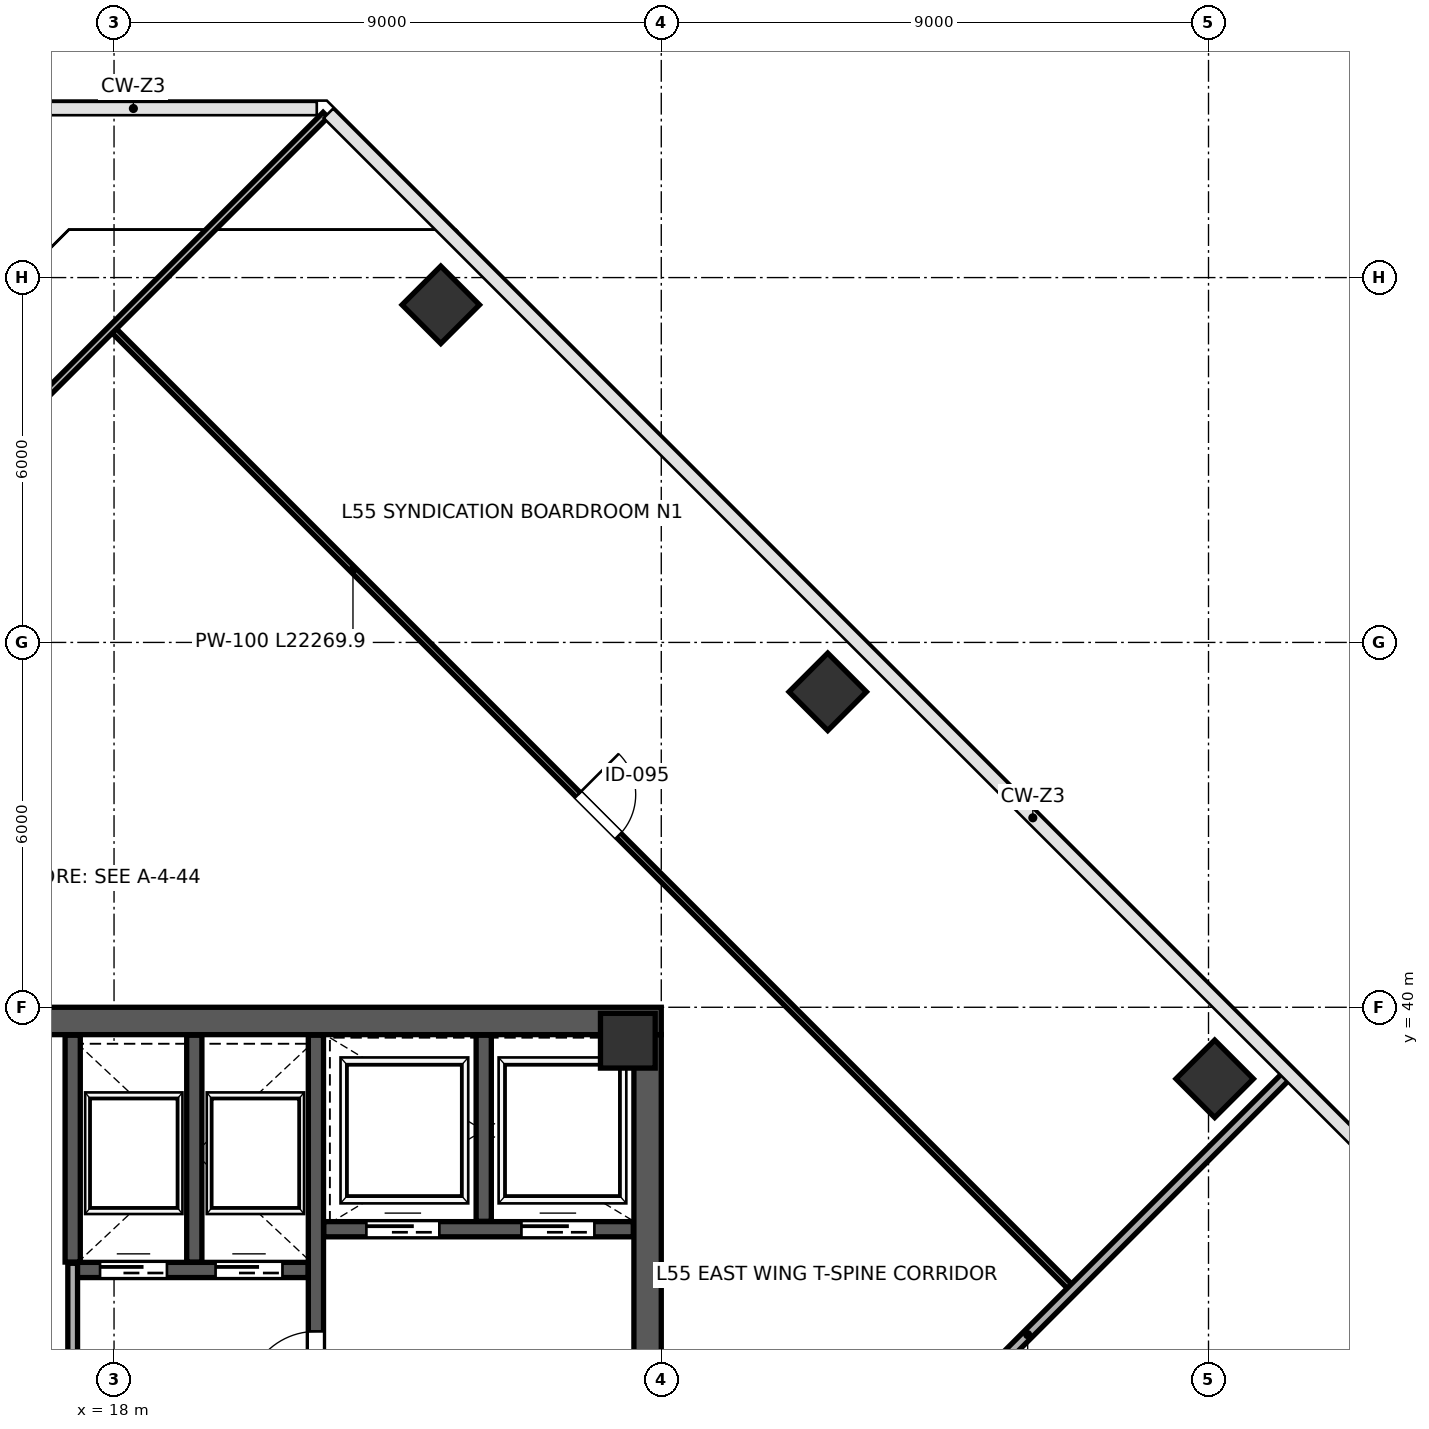
"""IFC4 building model, lengths in metres.
Left out: names, types, materials, properties, quantities, classifications, styles, units other than length and angle.
Written with IfcOpenShell. Run it as: python <this file> out.ifc"""

import sys

from ifc_helpers import new_model, si_unit, direction, frame, frame_2d, origin, origin_2d, place, context, subcontext, project, spatial, rectangle, extrude, source, transform, mapped, element, fill, save


model = new_model("IFC4")
c1 = context("Model", 3, precision=1e-05, world=origin(), true_north=direction((0.0, 1.0)))
c2 = subcontext(c1, "Body", "Model", "MODEL_VIEW")
j1 = project(units=[si_unit("LENGTHUNIT", "METRE"), si_unit("PLANEANGLEUNIT", "RADIAN")], contexts=[c1])
p1 = place(None, origin())
s1 = spatial("IfcSite", under=j1, at=p1, CompositionType="ELEMENT")
p2 = place(p1, origin())
s2 = spatial("IfcBuilding", under=s1, at=p2, CompositionType="ELEMENT")
p3 = place(p2, frame((0.0, 0.0, 245.8)))
s3 = spatial("IfcBuildingStorey", under=s2, at=p3, CompositionType="ELEMENT", Elevation=245.8)
m1 = source(origin(), c2, "Body", "SweptSolid", [
    extrude(rectangle(XDim=0.9, YDim=0.9, at=origin_2d()), origin(), (0.0, 0.0, 1.0), 4.198),
])
p4 = place(p3, frame((26.45, 39.45, 0.001), z_axis=(0.0, 0.0, 1.0), x_axis=(1.0, 0.0, 0.0)))
e1 = element("IfcColumn", 1, at=p4, inside=s3, PredefinedType="COLUMN", context=c2, shape_type="MappedRepresentation", body=[
    mapped(m1, transform((0.0, 0.0, 0.0), scale=1.0)),
])
m2 = source(origin(), c2, "Body", "SweptSolid", [
    extrude(rectangle(XDim=0.9, YDim=0.9, at=origin_2d()), origin(), (0.0, 0.0, 1.0), 4.198),
])
for number, where, z_axis, x_axis in (
    (2, (23.374, 51.552, 0.001), (0.0, 0.0, 1.0), (-0.707, 0.707, 0.0)),
    (3, (29.738, 45.188, 0.001), (0.0, 0.0, 1.0), (-0.707, 0.707, 0.0)),
    (4, (36.102, 38.823, 0.001), (0.0, 0.0, 1.0), (-0.707, 0.707, 0.0)),
):
    element("IfcColumn", number, at=place(p3, frame(where, z_axis=z_axis, x_axis=x_axis)), inside=s3, PredefinedType="COLUMN", context=c2, shape_type="MappedRepresentation", body=[
        mapped(m2, transform((0.0, 0.0, 0.0), scale=1.0)),
    ])
p5 = place(p3, frame((26.775, 24.45, 0.0), z_axis=(0.0, 0.0, 1.0), x_axis=(0.0, 1.0, 0.0)))
e5 = element("IfcWall", 5, at=p5, inside=s3, PredefinedType="SHEAR", context=c2, shape_type="SweptSolid", body=[
    extrude(rectangle(XDim=15.1, YDim=0.45, at=frame_2d((7.55, 0.0))), origin(), (0.0, 0.0, 1.0), 3.96),
])
p6 = place(p5, frame((8.6, 0.0, 0.0)))
e6 = element("IfcOpeningElement", 6, at=p6, cuts=e5, PredefinedType="OPENING", context=c2, shape_type="SweptSolid", body=[
    extrude(rectangle(XDim=1.15, YDim=2.2, at=frame_2d((0.575, 1.1))), frame((0.0, 0.235, 0.0), z_axis=(0.0, -1.0, 0.0), x_axis=(1.0, 0.0, 0.0)), (0.0, 0.0, 1.0), 0.47),
])
p7 = place(p3, frame((9.0, 39.775, 0.0), z_axis=(0.0, 0.0, 1.0), x_axis=(1.0, 0.0, 0.0)))
e7 = element("IfcWall", 7, at=p7, inside=s3, PredefinedType="SHEAR", context=c2, shape_type="SweptSolid", body=[
    extrude(rectangle(XDim=18.0, YDim=0.45, at=frame_2d((9.0, 0.0))), origin(), (0.0, 0.0, 1.0), 3.96),
])
p8 = place(p3, frame((21.32, 32.12, 0.0), z_axis=(0.0, 0.0, 1.0), x_axis=(0.0, 1.0, 0.0)))
e8 = element("IfcWall", 8, at=p8, inside=s3, PredefinedType="SHEAR", context=c2, shape_type="SweptSolid", body=[
    extrude(rectangle(XDim=7.42, YDim=0.25, at=frame_2d((3.71, 0.0))), origin(), (0.0, 0.0, 1.0), 3.96),
])
p9 = place(p8, frame((1.4, 0.0, 0.0)))
e9 = element("IfcOpeningElement", 9, at=p9, cuts=e8, PredefinedType="OPENING", context=c2, shape_type="SweptSolid", body=[
    extrude(rectangle(XDim=1.15, YDim=2.2, at=frame_2d((0.575, 1.1))), frame((0.0, 0.135, 0.0), z_axis=(0.0, -1.0, 0.0), x_axis=(1.0, 0.0, 0.0)), (0.0, 0.0, 1.0), 0.27),
])
p10 = place(p3, frame((21.45, 36.35, 0.0), z_axis=(0.0, 0.0, 1.0), x_axis=(1.0, 0.0, 0.0)))
e10 = element("IfcWall", 10, at=p10, inside=s3, PredefinedType="SHEAR", context=c2, shape_type="SweptSolid", body=[
    extrude(rectangle(XDim=5.09, YDim=0.25, at=frame_2d((2.545, 0.0))), origin(), (0.0, 0.0, 1.0), 3.96),
])
p11 = place(p10, frame((0.7, 0.0, 0.0)))
e11 = element("IfcOpeningElement", 11, at=p11, cuts=e10, PredefinedType="OPENING", context=c2, shape_type="SweptSolid", body=[
    extrude(rectangle(XDim=1.2, YDim=2.2, at=frame_2d((0.6, 1.1))), frame((0.0, 0.135, 0.0), z_axis=(0.0, -1.0, 0.0), x_axis=(1.0, 0.0, 0.0)), (0.0, 0.0, 1.0), 0.27),
])
p12 = place(p10, frame((3.25, 0.0, 0.0)))
e12 = element("IfcOpeningElement", 12, at=p12, cuts=e10, PredefinedType="OPENING", context=c2, shape_type="SweptSolid", body=[
    extrude(rectangle(XDim=1.2, YDim=2.2, at=frame_2d((0.6, 1.1))), frame((0.0, 0.135, 0.0), z_axis=(0.0, -1.0, 0.0), x_axis=(1.0, 0.0, 0.0)), (0.0, 0.0, 1.0), 0.27),
])
p13 = place(p3, frame((24.08, 36.48, 0.0), z_axis=(0.0, 0.0, 1.0), x_axis=(0.0, 1.0, 0.0)))
e13 = element("IfcWall", 13, at=p13, inside=s3, PredefinedType="SHEAR", context=c2, shape_type="SweptSolid", body=[
    extrude(rectangle(XDim=3.06, YDim=0.25, at=frame_2d((1.53, 0.0))), origin(), (0.0, 0.0, 1.0), 3.96),
])
p14 = place(p3, frame((17.32, 35.68, 0.0), z_axis=(0.0, 0.0, 1.0), x_axis=(1.0, 0.0, 0.0)))
e14 = element("IfcWall", 14, at=p14, inside=s3, PredefinedType="SHEAR", context=c2, shape_type="SweptSolid", body=[
    extrude(rectangle(XDim=3.87, YDim=0.25, at=frame_2d((1.935, 0.0))), origin(), (0.0, 0.0, 1.0), 3.96),
])
p15 = place(p14, frame((0.45, 0.0, 0.0)))
e15 = element("IfcOpeningElement", 15, at=p15, cuts=e14, PredefinedType="OPENING", context=c2, shape_type="SweptSolid", body=[
    extrude(rectangle(XDim=1.1, YDim=2.2, at=frame_2d((0.55, 1.1))), frame((0.0, 0.135, 0.0), z_axis=(0.0, -1.0, 0.0), x_axis=(1.0, 0.0, 0.0)), (0.0, 0.0, 1.0), 0.27),
])
p16 = place(p14, frame((2.35, 0.0, 0.0)))
e16 = element("IfcOpeningElement", 16, at=p16, cuts=e14, PredefinedType="OPENING", context=c2, shape_type="SweptSolid", body=[
    extrude(rectangle(XDim=1.1, YDim=2.2, at=frame_2d((0.55, 1.1))), frame((0.0, 0.135, 0.0), z_axis=(0.0, -1.0, 0.0), x_axis=(1.0, 0.0, 0.0)), (0.0, 0.0, 1.0), 0.27),
])
for number, where, z_axis, x_axis in (
    (17, (17.32, 35.81, 0.0), (0.0, 0.0, 1.0), (0.0, 1.0, 0.0)),
    (18, (19.32, 35.81, 0.0), (0.0, 0.0, 1.0), (0.0, 1.0, 0.0)),
):
    element("IfcWall", number, at=place(p3, frame(where, z_axis=z_axis, x_axis=x_axis)), inside=s3, PredefinedType="SHEAR", context=c2, shape_type="SweptSolid", body=[
        extrude(rectangle(XDim=3.73, YDim=0.25, at=frame_2d((1.865, 0.0))), origin(), (0.0, 0.0, 1.0), 3.96),
    ])
p17 = place(p3, frame((17.32, 33.86, 0.0), z_axis=(0.0, 0.0, 1.0), x_axis=(0.0, 1.0, 0.0)))
e19 = element("IfcWall", 19, at=p17, inside=s3, PredefinedType="PARTITIONING", context=c2, shape_type="SweptSolid", body=[
    extrude(rectangle(XDim=1.93, YDim=0.16, at=frame_2d((0.965, 0.0))), origin(), (0.0, 0.0, 1.0), 3.96),
])
p18 = place(p3, frame((17.993, 51.134, 0.0), z_axis=(0.0, 0.0, 1.0), x_axis=(0.707106781187, -0.707106781187, 0.0)))
e20 = element("IfcWall", 20, at=p18, inside=s3, PredefinedType="PARTITIONING", context=c2, shape_type="SweptSolid", body=[
    extrude(rectangle(XDim=22.27, YDim=0.1, at=frame_2d((11.135, 0.0))), origin(), (0.0, 0.0, 1.0), 3.96),
])
p19 = place(p18, frame((10.8, 0.0, 0.0)))
e21 = element("IfcOpeningElement", 21, at=p19, cuts=e20, PredefinedType="OPENING", context=c2, shape_type="SweptSolid", body=[
    extrude(rectangle(XDim=0.95, YDim=2.15, at=frame_2d((0.475, 1.075))), frame((0.0, 0.06, 0.0), z_axis=(0.0, -1.0, 0.0), x_axis=(1.0, 0.0, 0.0)), (0.0, 0.0, 1.0), 0.12),
])
p20 = place(p3, frame((0.775, 33.973, 0.0), z_axis=(0.0, 0.0, 1.0), x_axis=(0.707106781187, 0.707106781187, 0.0)))
e22 = element("IfcWall", 22, at=p20, inside=s3, PredefinedType="PARTITIONING", context=c2, shape_type="SweptSolid", body=[
    extrude(rectangle(XDim=29.28, YDim=0.115, at=frame_2d((14.64, 0.0))), origin(), (0.0, 0.0, 1.0), 3.96),
])
p21 = place(p20, frame((2.6, 0.0, 0.0)))
e23 = element("IfcOpeningElement", 23, at=p21, cuts=e22, PredefinedType="OPENING", context=c2, shape_type="SweptSolid", body=[
    extrude(rectangle(XDim=0.95, YDim=2.15, at=frame_2d((0.475, 1.075))), frame((0.0, 0.067, 0.0), z_axis=(0.0, -1.0, 0.0), x_axis=(1.0, 0.0, 0.0)), (0.0, 0.0, 1.0), 0.135),
])
p22 = place(p3, frame((28.769, 30.36, 0.0), z_axis=(0.0, 0.0, 1.0), x_axis=(0.707116919863, 0.707096642365, 0.0)))
e24 = element("IfcWall", 24, at=p22, inside=s3, PredefinedType="PARTITIONING", context=c2, shape_type="SweptSolid", body=[
    extrude(rectangle(XDim=12.04, YDim=0.16, at=frame_2d((6.02, 0.0))), origin(), (0.0, 0.0, 1.0), 3.195),
])
m3 = source(origin(), c2, "Body", "SweptSolid", [
    extrude(rectangle(XDim=1.15, YDim=2.2, at=frame_2d((0.575, 1.1))), frame((0.0, 0.025, 0.0), z_axis=(0.0, -1.0, 0.0), x_axis=(1.0, 0.0, 0.0)), (0.0, 0.0, 1.0), 0.05),
])
p23 = place(p9, origin())
e25 = element("IfcDoor", 25, at=p23, inside=s3, OperationType="SINGLE_SWING_LEFT", PredefinedType="DOOR", context=c2, shape_type="MappedRepresentation", body=[
    mapped(m3, transform((0.0, 0.0, 0.0), scale=1.0)),
])
fill(e9, e25)
m4 = source(origin(), c2, "Body", "SweptSolid", [
    extrude(rectangle(XDim=1.1, YDim=2.2, at=frame_2d((0.55, 1.1))), frame((0.0, 0.025, 0.0), z_axis=(0.0, -1.0, 0.0), x_axis=(1.0, 0.0, 0.0)), (0.0, 0.0, 1.0), 0.05),
])
p24 = place(p15, origin())
e26 = element("IfcDoor", 26, at=p24, inside=s3, OperationType="SLIDING_TO_LEFT", PredefinedType="DOOR", context=c2, shape_type="MappedRepresentation", body=[
    mapped(m4, transform((0.0, 0.0, 0.0), scale=1.0)),
])
fill(e15, e26)
p25 = place(p16, origin())
e27 = element("IfcDoor", 27, at=p25, inside=s3, OperationType="SLIDING_TO_RIGHT", PredefinedType="DOOR", context=c2, shape_type="MappedRepresentation", body=[
    mapped(m4, transform((0.0, 0.0, 0.0), scale=1.0)),
])
fill(e16, e27)
m5 = source(origin(), c2, "Body", "SweptSolid", [
    extrude(rectangle(XDim=1.2, YDim=2.2, at=frame_2d((0.6, 1.1))), frame((0.0, 0.025, 0.0), z_axis=(0.0, -1.0, 0.0), x_axis=(1.0, 0.0, 0.0)), (0.0, 0.0, 1.0), 0.05),
])
p26 = place(p11, origin())
e28 = element("IfcDoor", 28, at=p26, inside=s3, OperationType="SLIDING_TO_LEFT", PredefinedType="DOOR", context=c2, shape_type="MappedRepresentation", body=[
    mapped(m5, transform((0.0, 0.0, 0.0), scale=1.0)),
])
fill(e11, e28)
p27 = place(p12, origin())
e29 = element("IfcDoor", 29, at=p27, inside=s3, OperationType="SLIDING_TO_RIGHT", PredefinedType="DOOR", context=c2, shape_type="MappedRepresentation", body=[
    mapped(m5, transform((0.0, 0.0, 0.0), scale=1.0)),
])
fill(e12, e29)
m6 = source(origin(), c2, "Body", "SweptSolid", [
    extrude(rectangle(XDim=0.95, YDim=2.15, at=frame_2d((0.475, 1.075))), frame((0.0, 0.025, 0.0), z_axis=(0.0, -1.0, 0.0), x_axis=(1.0, 0.0, 0.0)), (0.0, 0.0, 1.0), 0.05),
])
p28 = place(p19, origin())
e30 = element("IfcDoor", 30, at=p28, inside=s3, OperationType="SINGLE_SWING_LEFT", PredefinedType="DOOR", context=c2, shape_type="MappedRepresentation", body=[
    mapped(m6, transform((0.0, 0.0, 0.0), scale=1.0)),
])
fill(e21, e30)
save(model, sys.argv[1])
